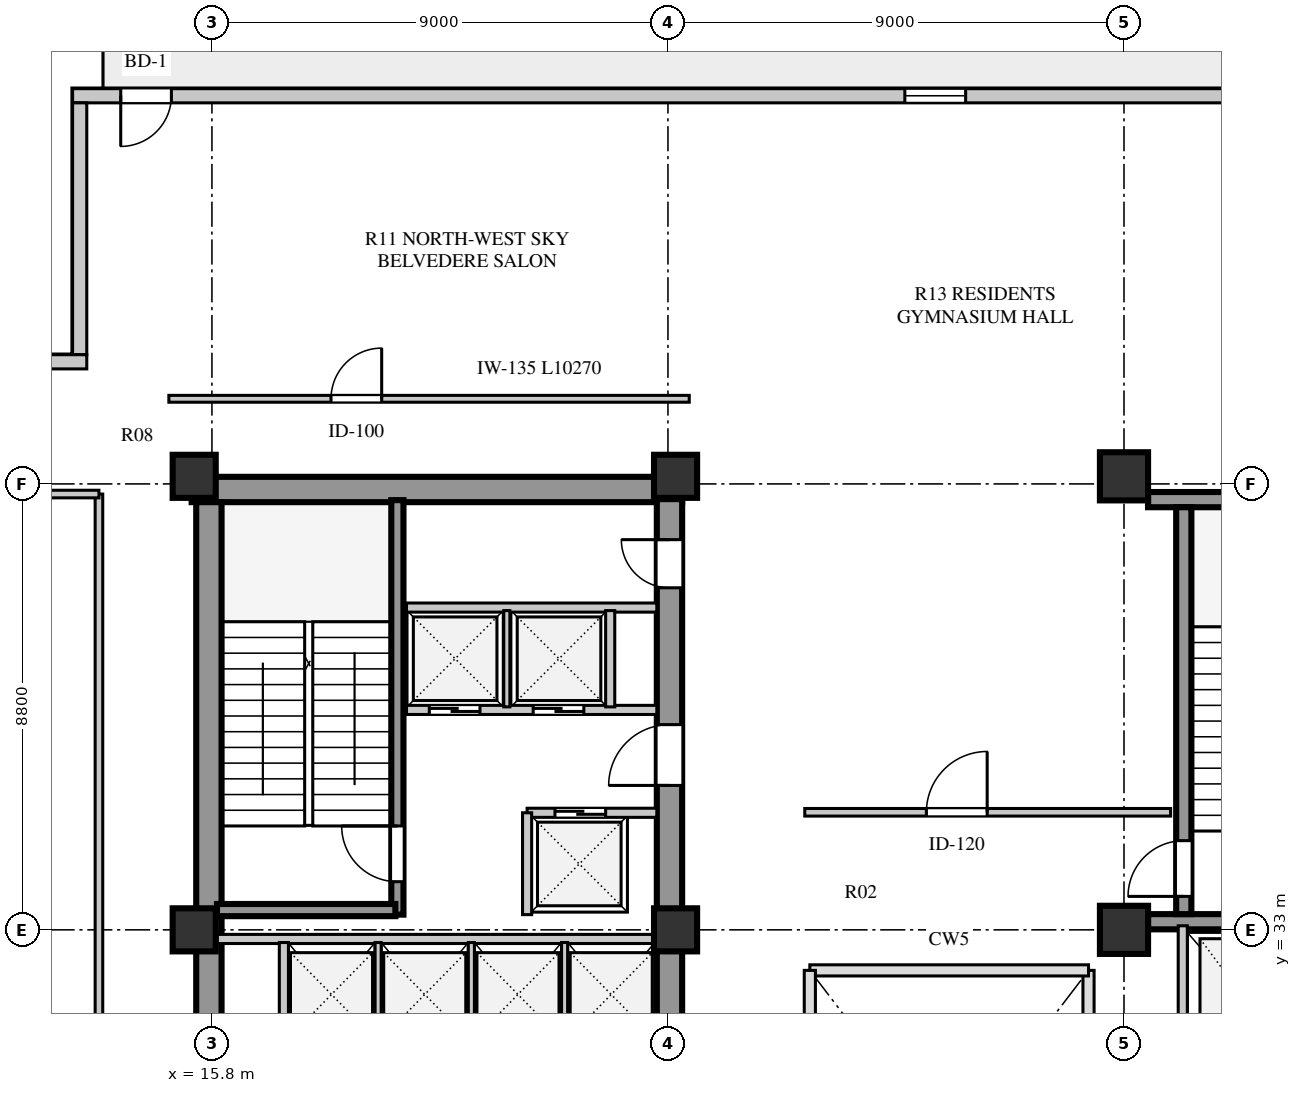
"""IFC4 building model, lengths in metres.
Left out: names, types, materials, properties, quantities, classifications, styles, units other than length and angle.
Written with IfcOpenShell. Run it as: python <this file> out.ifc"""

import sys

from ifc_helpers import new_model, si_unit, direction, frame, frame_2d, origin, origin_2d, place, context, subcontext, project, spatial, rectangle, extrude, element, fill, save


model = new_model("IFC4")
c1 = context("Model", 3, precision=1e-05, world=origin(), true_north=direction((0.0, 1.0)))
c2 = subcontext(c1, "Body", "Model", "MODEL_VIEW")
j1 = project(units=[si_unit("LENGTHUNIT", "METRE"), si_unit("PLANEANGLEUNIT", "RADIAN")], contexts=[c1])
p1 = place(None, origin())
s1 = spatial("IfcSite", under=j1, at=p1, CompositionType="ELEMENT")
p2 = place(p1, origin())
s2 = spatial("IfcBuilding", under=s1, at=p2, CompositionType="ELEMENT")
p3 = place(p2, frame((0.0, 0.0, 208.9)))
s3 = spatial("IfcBuildingStorey", under=s2, at=p3, CompositionType="ELEMENT", Elevation=208.9)
p4 = place(p3, frame((15.4, 41.69, 0.0), z_axis=(0.0, 0.0, 1.0), x_axis=(1.0, 0.0, 0.0)))
e1 = element("IfcWall", 1, at=p4, inside=s3, PredefinedType="SHEAR", context=c2, shape_type="SweptSolid", body=[
    extrude(rectangle(XDim=9.68, YDim=0.5, at=frame_2d((4.84, 0.0))), origin(), (0.0, 0.0, 1.0), 4.96),
])
p5 = place(p3, frame((15.74, 15.81, 0.0), z_axis=(0.0, 0.0, 1.0), x_axis=(0.0, 1.0, 0.0)))
e2 = element("IfcWall", 2, at=p5, inside=s3, PredefinedType="SHEAR", context=c2, shape_type="SweptSolid", body=[
    extrude(rectangle(XDim=25.63, YDim=0.5, at=frame_2d((12.815, 0.0))), origin(), (0.0, 0.0, 1.0), 4.96),
])
p6 = place(p3, frame((24.83, 15.74, 0.0), z_axis=(0.0, 0.0, 1.0), x_axis=(0.0, 1.0, 0.0)))
e3 = element("IfcWall", 3, at=p6, inside=s3, PredefinedType="SHEAR", context=c2, shape_type="SweptSolid", body=[
    extrude(rectangle(XDim=25.76, YDim=0.5, at=frame_2d((12.88, 0.0))), origin(), (0.0, 0.0, 1.0), 4.96),
])
p7 = place(p6, frame((1.61, 0.0, 0.0)))
e4 = element("IfcOpeningElement", 4, at=p7, cuts=e3, PredefinedType="OPENING", context=c2, shape_type="SweptSolid", body=[
    extrude(rectangle(XDim=1.2, YDim=2.1, at=frame_2d((0.6, 1.05))), frame((0.0, 0.26, 0.0), z_axis=(0.0, -1.0, 0.0), x_axis=(1.0, 0.0, 0.0)), (0.0, 0.0, 1.0), 0.52),
])
p8 = place(p6, frame((6.78, 0.0, 0.0)))
e5 = element("IfcOpeningElement", 5, at=p8, cuts=e3, PredefinedType="OPENING", context=c2, shape_type="SweptSolid", body=[
    extrude(rectangle(XDim=0.85, YDim=2.06, at=frame_2d((0.425, 1.03))), frame((0.0, 0.26, 0.0), z_axis=(0.0, -1.0, 0.0), x_axis=(1.0, 0.0, 0.0)), (0.0, 0.0, 1.0), 0.52),
])
p9 = place(p6, frame((12.11, 0.0, 0.0)))
e6 = element("IfcOpeningElement", 6, at=p9, cuts=e3, PredefinedType="OPENING", context=c2, shape_type="SweptSolid", body=[
    extrude(rectangle(XDim=1.5, YDim=2.12, at=frame_2d((0.75, 1.06))), frame((0.0, 0.26, 0.0), z_axis=(0.0, -1.0, 0.0), x_axis=(1.0, 0.0, 0.0)), (0.0, 0.0, 1.0), 0.52),
])
p10 = place(p6, frame((20.11, 0.0, 0.0)))
e7 = element("IfcOpeningElement", 7, at=p10, cuts=e3, PredefinedType="OPENING", context=c2, shape_type="SweptSolid", body=[
    extrude(rectangle(XDim=1.2, YDim=2.12, at=frame_2d((0.6, 1.06))), frame((0.0, 0.26, 0.0), z_axis=(0.0, -1.0, 0.0), x_axis=(1.0, 0.0, 0.0)), (0.0, 0.0, 1.0), 0.52),
])
p11 = place(p6, frame((24.01, 0.0, 0.0)))
e8 = element("IfcOpeningElement", 8, at=p11, cuts=e3, PredefinedType="OPENING", context=c2, shape_type="SweptSolid", body=[
    extrude(rectangle(XDim=0.95, YDim=2.1, at=frame_2d((0.475, 1.05))), frame((0.0, 0.26, 0.0), z_axis=(0.0, -1.0, 0.0), x_axis=(1.0, 0.0, 0.0)), (0.0, 0.0, 1.0), 0.52),
])
for number, where, z_axis, x_axis in (
    (9, (34.275, 33.16, 0.0), (0.0, 0.0, 1.0), (1.0, 0.0, 0.0)),
    (10, (34.275, 41.49, 0.0), (0.0, 0.0, 1.0), (1.0, 0.0, 0.0)),
):
    element("IfcWall", number, at=place(p3, frame(where, z_axis=z_axis, x_axis=x_axis)), inside=s3, PredefinedType="SHEAR", context=c2, shape_type="SweptSolid", body=[
        extrude(rectangle(XDim=4.595, YDim=0.3, at=frame_2d((2.298, 0.0))), origin(), (0.0, 0.0, 1.0), 4.96),
    ])
p12 = place(p3, frame((34.98, 33.31, 0.0), z_axis=(0.0, 0.0, 1.0), x_axis=(0.0, 1.0, 0.0)))
e11 = element("IfcWall", 11, at=p12, inside=s3, PredefinedType="SHEAR", context=c2, shape_type="SweptSolid", body=[
    extrude(rectangle(XDim=8.03, YDim=0.3, at=frame_2d((4.015, 0.0))), origin(), (0.0, 0.0, 1.0), 4.96),
])
p13 = place(p12, frame((0.35, 0.0, 0.0)))
e12 = element("IfcOpeningElement", 12, at=p13, cuts=e11, PredefinedType="OPENING", context=c2, shape_type="SweptSolid", body=[
    extrude(rectangle(XDim=1.1, YDim=2.1, at=frame_2d((0.55, 1.05))), frame((0.0, 0.16, 0.0), z_axis=(0.0, -1.0, 0.0), x_axis=(1.0, 0.0, 0.0)), (0.0, 0.0, 1.0), 0.32),
])
for number, where, z_axis, x_axis in (
    (13, (15.45, 33.0, 0.0), (0.0, 0.0, 1.0), (1.0, 0.0, 0.0)),
    (14, (15.45, 41.95, 0.0), (0.0, 0.0, 1.0), (1.0, 0.0, 0.0)),
    (15, (24.95, 33.0, 0.0), (0.0, 0.0, 1.0), (1.0, 0.0, 0.0)),
    (16, (24.95, 41.95, 0.0), (0.0, 0.0, 1.0), (1.0, 0.0, 0.0)),
):
    element("IfcColumn", number, at=place(p3, frame(where, z_axis=z_axis, x_axis=x_axis)), inside=s3, PredefinedType="COLUMN", context=c2, shape_type="SweptSolid", body=[
        extrude(rectangle(XDim=0.85, YDim=0.85, at=origin_2d()), origin(), (0.0, 0.0, 1.0), 4.96),
    ])
for number, where, z_axis, x_axis in (
    (17, (33.8, 33.0, 0.0), (0.0, 0.0, 1.0), (1.0, 0.0, 0.0)),
    (18, (33.8, 41.95, 0.0), (0.0, 0.0, 1.0), (1.0, 0.0, 0.0)),
):
    element("IfcColumn", number, at=place(p3, frame(where, z_axis=z_axis, x_axis=x_axis)), inside=s3, PredefinedType="COLUMN", context=c2, shape_type="SweptSolid", body=[
        extrude(rectangle(XDim=0.95, YDim=0.95, at=origin_2d()), origin(), (0.0, 0.0, 1.0), 4.96),
    ])
p14 = place(p3, frame((45.55, 49.46, 0.0), z_axis=(0.0, 0.0, 1.0), x_axis=(-1.0, 0.0, 0.0)))
e19 = element("IfcWall", 19, at=p14, inside=s3, PredefinedType="STANDARD", context=c2, shape_type="SweptSolid", body=[
    extrude(rectangle(XDim=32.5, YDim=0.28, at=frame_2d((16.25, 0.0))), origin(), (0.0, 0.0, 1.0), 4.96),
])
p15 = place(p14, frame((30.55, 0.0, 0.0)))
e20 = element("IfcOpeningElement", 20, at=p15, cuts=e19, PredefinedType="OPENING", context=c2, shape_type="SweptSolid", body=[
    extrude(rectangle(XDim=1.0, YDim=2.05, at=frame_2d((0.5, 1.025))), frame((0.0, 0.15, 0.0), z_axis=(0.0, -1.0, 0.0), x_axis=(1.0, 0.0, 0.0)), (0.0, 0.0, 1.0), 0.3),
])
p16 = place(p14, frame((14.875, 0.0, 0.65)))
e21 = element("IfcOpeningElement", 21, at=p16, cuts=e19, PredefinedType="OPENING", context=c2, shape_type="SweptSolid", body=[
    extrude(rectangle(XDim=1.2, YDim=1.25, at=frame_2d((0.6, 0.625))), frame((0.0, 0.15, 0.0), z_axis=(0.0, -1.0, 0.0), x_axis=(1.0, 0.0, 0.0)), (0.0, 0.0, 1.0), 0.3),
])
p17 = place(p3, frame((13.19, 49.32, 0.0), z_axis=(0.0, 0.0, 1.0), x_axis=(0.0, -1.0, 0.0)))
e22 = element("IfcWall", 22, at=p17, inside=s3, PredefinedType="STANDARD", context=c2, shape_type="SweptSolid", body=[
    extrude(rectangle(XDim=4.97, YDim=0.28, at=frame_2d((2.485, 0.0))), origin(), (0.0, 0.0, 1.0), 4.96),
])
p18 = place(p3, frame((13.33, 44.21, 0.0), z_axis=(0.0, 0.0, 1.0), x_axis=(-1.0, 0.0, 0.0)))
e23 = element("IfcWall", 23, at=p18, inside=s3, PredefinedType="STANDARD", context=c2, shape_type="SweptSolid", body=[
    extrude(rectangle(XDim=5.53, YDim=0.28, at=frame_2d((2.765, 0.0))), origin(), (0.0, 0.0, 1.0), 4.96),
])
p19 = place(p3, frame((15.9, 32.82, 0.0), z_axis=(0.0, 0.0, 1.0), x_axis=(1.0, 0.0, 0.0)))
e24 = element("IfcWall", 24, at=p19, inside=s3, PredefinedType="SOLIDWALL", context=c2, shape_type="SweptSolid", body=[
    extrude(rectangle(XDim=8.68, YDim=0.18, at=frame_2d((4.34, 0.0))), origin(), (0.0, 0.0, 1.0), 4.31),
])
p20 = place(p3, frame((17.22, 30.7, 0.0), z_axis=(0.0, 0.0, 1.0), x_axis=(0.0, 1.0, 0.0)))
e25 = element("IfcWall", 25, at=p20, inside=s3, PredefinedType="SOLIDWALL", context=c2, shape_type="SweptSolid", body=[
    extrude(rectangle(XDim=2.05, YDim=0.18, at=frame_2d((1.025, 0.0))), origin(), (0.0, 0.0, 1.0), 4.96),
])
for number, where, z_axis, x_axis in (
    (26, (19.08, 30.7, 0.0), (0.0, 0.0, 1.0), (0.0, 1.0, 0.0)),
    (27, (20.92, 30.7, 0.0), (0.0, 0.0, 1.0), (0.0, 1.0, 0.0)),
    (28, (22.76, 30.7, 0.0), (0.0, 0.0, 1.0), (0.0, 1.0, 0.0)),
):
    element("IfcWall", number, at=place(p3, frame(where, z_axis=z_axis, x_axis=x_axis)), inside=s3, PredefinedType="PARTITIONING", context=c2, shape_type="SweptSolid", body=[
        extrude(rectangle(XDim=2.05, YDim=0.12, at=frame_2d((1.025, 0.0))), origin(), (0.0, 0.0, 1.0), 4.96),
    ])
p21 = place(p3, frame((19.46, 33.3, 0.0), z_axis=(0.0, 0.0, 1.0), x_axis=(0.0, 1.0, 0.0)))
e29 = element("IfcWall", 29, at=p21, inside=s3, PredefinedType="SHEAR", context=c2, shape_type="SweptSolid", body=[
    extrude(rectangle(XDim=8.18, YDim=0.24, at=frame_2d((4.09, 0.0))), origin(), (0.0, 0.0, 1.0), 5.2),
])
p22 = place(p21, frame((0.65, 0.0, 0.0)))
e30 = element("IfcOpeningElement", 30, at=p22, cuts=e29, PredefinedType="OPENING", context=c2, shape_type="SweptSolid", body=[
    extrude(rectangle(XDim=1.1, YDim=2.1, at=frame_2d((0.55, 1.05))), frame((0.0, 0.13, 0.0), z_axis=(0.0, -1.0, 0.0), x_axis=(1.0, 0.0, 0.0)), (0.0, 0.0, 1.0), 0.26),
])
p23 = place(p3, frame((15.9, 33.39, 0.0), z_axis=(0.0, 0.0, 1.0), x_axis=(1.0, 0.0, 0.0)))
e31 = element("IfcWall", 31, at=p23, inside=s3, PredefinedType="SHEAR", context=c2, shape_type="SweptSolid", body=[
    extrude(rectangle(XDim=3.52, YDim=0.24, at=frame_2d((1.76, 0.0))), origin(), (0.0, 0.0, 1.0), 5.2),
])
p24 = place(p3, frame((22.02, 35.31, 0.0), z_axis=(0.0, 0.0, 1.0), x_axis=(1.0, 0.0, 0.0)))
e32 = element("IfcWall", 32, at=p24, inside=s3, PredefinedType="SOLIDWALL", context=c2, shape_type="SweptSolid", body=[
    extrude(rectangle(XDim=2.56, YDim=0.18, at=frame_2d((1.28, 0.0))), origin(), (0.0, 0.0, 1.0), 4.96),
])
p25 = place(p24, frame((0.55, 0.0, 0.0)))
e33 = element("IfcOpeningElement", 33, at=p25, cuts=e32, PredefinedType="OPENING", context=c2, shape_type="SweptSolid", body=[
    extrude(rectangle(XDim=1.0, YDim=2.1, at=frame_2d((0.5, 1.05))), frame((0.0, 0.1, 0.0), z_axis=(0.0, -1.0, 0.0), x_axis=(1.0, 0.0, 0.0)), (0.0, 0.0, 1.0), 0.2),
])
p26 = place(p3, frame((22.02, 33.3, 0.0), z_axis=(0.0, 0.0, 1.0), x_axis=(0.0, 1.0, 0.0)))
e34 = element("IfcWall", 34, at=p26, inside=s3, PredefinedType="SOLIDWALL", context=c2, shape_type="SweptSolid", body=[
    extrude(rectangle(XDim=2.01, YDim=0.18, at=frame_2d((1.005, 0.0))), origin(), (0.0, 0.0, 1.0), 4.96),
])
p27 = place(p3, frame((19.64, 37.34, 0.0), z_axis=(0.0, 0.0, 1.0), x_axis=(1.0, 0.0, 0.0)))
e35 = element("IfcWall", 35, at=p27, inside=s3, PredefinedType="SOLIDWALL", context=c2, shape_type="SweptSolid", body=[
    extrude(rectangle(XDim=4.94, YDim=0.18, at=frame_2d((2.47, 0.0))), origin(), (0.0, 0.0, 1.0), 4.96),
])
p28 = place(p27, frame((0.45, 0.0, 0.0)))
e36 = element("IfcOpeningElement", 36, at=p28, cuts=e35, PredefinedType="OPENING", context=c2, shape_type="SweptSolid", body=[
    extrude(rectangle(XDim=1.0, YDim=2.1, at=frame_2d((0.5, 1.05))), frame((0.0, 0.1, 0.0), z_axis=(0.0, -1.0, 0.0), x_axis=(1.0, 0.0, 0.0)), (0.0, 0.0, 1.0), 0.2),
])
p29 = place(p27, frame((2.5, 0.0, 0.0)))
e37 = element("IfcOpeningElement", 37, at=p29, cuts=e35, PredefinedType="OPENING", context=c2, shape_type="SweptSolid", body=[
    extrude(rectangle(XDim=1.0, YDim=2.1, at=frame_2d((0.5, 1.05))), frame((0.0, 0.1, 0.0), z_axis=(0.0, -1.0, 0.0), x_axis=(1.0, 0.0, 0.0)), (0.0, 0.0, 1.0), 0.2),
])
p30 = place(p3, frame((19.64, 39.36, 0.0), z_axis=(0.0, 0.0, 1.0), x_axis=(1.0, 0.0, 0.0)))
e38 = element("IfcWall", 38, at=p30, inside=s3, PredefinedType="SOLIDWALL", context=c2, shape_type="SweptSolid", body=[
    extrude(rectangle(XDim=4.94, YDim=0.18, at=frame_2d((2.47, 0.0))), origin(), (0.0, 0.0, 1.0), 4.96),
])
p31 = place(p3, frame((21.62, 37.4, 0.0), z_axis=(0.0, 0.0, 1.0), x_axis=(0.0, 1.0, 0.0)))
e39 = element("IfcWall", 39, at=p31, inside=s3, PredefinedType="PARTITIONING", context=c2, shape_type="SweptSolid", body=[
    extrude(rectangle(XDim=1.9, YDim=0.12, at=frame_2d((0.95, 0.0))), origin(), (0.0, 0.0, 1.0), 4.96),
])
p32 = place(p3, frame((23.66, 37.4, 0.0), z_axis=(0.0, 0.0, 1.0), x_axis=(0.0, 1.0, 0.0)))
e40 = element("IfcWall", 40, at=p32, inside=s3, PredefinedType="SOLIDWALL", context=c2, shape_type="SweptSolid", body=[
    extrude(rectangle(XDim=1.9, YDim=0.18, at=frame_2d((0.95, 0.0))), origin(), (0.0, 0.0, 1.0), 4.96),
])
p33 = place(p3, frame((34.96, 28.86, 0.0), z_axis=(0.0, 0.0, 1.0), x_axis=(0.0, 1.0, 0.0)))
e41 = element("IfcWall", 41, at=p33, inside=s3, PredefinedType="SOLIDWALL", context=c2, shape_type="SweptSolid", body=[
    extrude(rectangle(XDim=4.22, YDim=0.18, at=frame_2d((2.11, 0.0))), origin(), (0.0, 0.0, 1.0), 4.96),
])
p34 = place(p3, frame((13.57, 15.6, 0.0), z_axis=(0.0, 0.0, 1.0), x_axis=(0.0, 1.0, 0.0)))
e42 = element("IfcWall", 42, at=p34, inside=s3, PredefinedType="PARTITIONING", context=c2, shape_type="SweptSolid", body=[
    extrude(rectangle(XDim=26.0, YDim=0.15, at=frame_2d((13.0, 0.0))), origin(), (0.0, 0.0, 1.0), 4.96),
])
p35 = place(p34, frame((2.8, 0.0, 0.0)))
e43 = element("IfcOpeningElement", 43, at=p35, cuts=e42, PredefinedType="OPENING", context=c2, shape_type="SweptSolid", body=[
    extrude(rectangle(XDim=0.95, YDim=2.08, at=frame_2d((0.475, 1.04))), frame((0.0, 0.085, 0.0), z_axis=(0.0, -1.0, 0.0), x_axis=(1.0, 0.0, 0.0)), (0.0, 0.0, 1.0), 0.17),
])
p36 = place(p3, frame((8.08, 41.6, 0.0), z_axis=(0.0, 0.0, 1.0), x_axis=(1.0, 0.0, 0.0)))
e44 = element("IfcWall", 44, at=p36, inside=s3, PredefinedType="PARTITIONING", context=c2, shape_type="SweptSolid", body=[
    extrude(rectangle(XDim=5.49, YDim=0.15, at=frame_2d((2.745, 0.0))), origin(), (0.0, 0.0, 1.0), 3.88),
])
p37 = place(p3, frame((14.95, 43.48, 0.0), z_axis=(0.0, 0.0, 1.0), x_axis=(1.0, 0.0, 0.0)))
e45 = element("IfcWall", 45, at=p37, inside=s3, PredefinedType="PARTITIONING", context=c2, shape_type="SweptSolid", body=[
    extrude(rectangle(XDim=10.27, YDim=0.135, at=frame_2d((5.135, 0.0))), origin(), (0.0, 0.0, 1.0), 4.96),
])
p38 = place(p37, frame((3.2, 0.0, 0.0)))
e46 = element("IfcOpeningElement", 46, at=p38, cuts=e45, PredefinedType="OPENING", context=c2, shape_type="SweptSolid", body=[
    extrude(rectangle(XDim=1.0, YDim=2.08, at=frame_2d((0.5, 1.04))), frame((0.0, 0.078, 0.0), z_axis=(0.0, -1.0, 0.0), x_axis=(1.0, 0.0, 0.0)), (0.0, 0.0, 1.0), 0.155),
])
p39 = place(p3, frame((27.5, 35.32, 0.0), z_axis=(0.0, 0.0, 1.0), x_axis=(1.0, 0.0, 0.0)))
e47 = element("IfcWall", 47, at=p39, inside=s3, PredefinedType="PARTITIONING", context=c2, shape_type="SweptSolid", body=[
    extrude(rectangle(XDim=7.22, YDim=0.15, at=frame_2d((3.61, 0.0))), origin(), (0.0, 0.0, 1.0), 4.96),
])
p40 = place(p39, frame((2.4, 0.0, 0.0)))
e48 = element("IfcOpeningElement", 48, at=p40, cuts=e47, PredefinedType="OPENING", context=c2, shape_type="SweptSolid", body=[
    extrude(rectangle(XDim=1.2, YDim=2.1, at=frame_2d((0.6, 1.05))), frame((0.0, 0.085, 0.0), z_axis=(0.0, -1.0, 0.0), x_axis=(1.0, 0.0, 0.0)), (0.0, 0.0, 1.0), 0.17),
])
p41 = place(p15, frame((1.0, 0.0, 0.0), z_axis=(0.0, 0.0, 1.0), x_axis=(-1.0, 0.0, 0.0)))
e49 = element("IfcDoor", 49, at=p41, inside=s3, OperationType="SINGLE_SWING_LEFT", PredefinedType="DOOR", context=c2, shape_type="SweptSolid", body=[
    extrude(rectangle(XDim=1.0, YDim=2.05, at=frame_2d((0.5, 1.025))), frame((0.0, 0.025, 0.0), z_axis=(0.0, -1.0, 0.0), x_axis=(1.0, 0.0, 0.0)), (0.0, 0.0, 1.0), 0.05),
])
fill(e20, e49)
p42 = place(p16, origin())
e50 = element("IfcWindow", 50, at=p42, inside=s3, PartitioningType="SINGLE_PANEL", PredefinedType="WINDOW", context=c2, shape_type="SweptSolid", body=[
    extrude(rectangle(XDim=1.2, YDim=1.25, at=frame_2d((0.6, 0.625))), frame((0.0, 0.03, 0.0), z_axis=(0.0, -1.0, 0.0), x_axis=(1.0, 0.0, 0.0)), (0.0, 0.0, 1.0), 0.06),
])
fill(e21, e50)
p43 = place(p22, origin())
e51 = element("IfcDoor", 51, at=p43, inside=s3, OperationType="SINGLE_SWING_RIGHT", PredefinedType="DOOR", context=c2, shape_type="SweptSolid", body=[
    extrude(rectangle(XDim=1.1, YDim=2.1, at=frame_2d((0.55, 1.05))), frame((0.0, 0.025, 0.0), z_axis=(0.0, -1.0, 0.0), x_axis=(1.0, 0.0, 0.0)), (0.0, 0.0, 1.0), 0.05),
])
fill(e30, e51)
p44 = place(p10, frame((1.2, 0.0, 0.0), z_axis=(0.0, 0.0, 1.0), x_axis=(-1.0, 0.0, 0.0)))
e52 = element("IfcDoor", 52, at=p44, inside=s3, OperationType="SINGLE_SWING_RIGHT", PredefinedType="DOOR", context=c2, shape_type="SweptSolid", body=[
    extrude(rectangle(XDim=1.2, YDim=2.12, at=frame_2d((0.6, 1.06))), frame((0.0, 0.025, 0.0), z_axis=(0.0, -1.0, 0.0), x_axis=(1.0, 0.0, 0.0)), (0.0, 0.0, 1.0), 0.05),
])
fill(e7, e52)
p45 = place(p28, frame((1.0, 0.0, 0.0), z_axis=(0.0, 0.0, 1.0), x_axis=(-1.0, 0.0, 0.0)))
e53 = element("IfcDoor", 53, at=p45, inside=s3, OperationType="DOUBLE_DOOR_SLIDING", PredefinedType="DOOR", context=c2, shape_type="SweptSolid", body=[
    extrude(rectangle(XDim=1.0, YDim=2.1, at=frame_2d((0.5, 1.05))), frame((0.0, 0.025, 0.0), z_axis=(0.0, -1.0, 0.0), x_axis=(1.0, 0.0, 0.0)), (0.0, 0.0, 1.0), 0.05),
])
fill(e36, e53)
p46 = place(p29, frame((1.0, 0.0, 0.0), z_axis=(0.0, 0.0, 1.0), x_axis=(-1.0, 0.0, 0.0)))
e54 = element("IfcDoor", 54, at=p46, inside=s3, OperationType="DOUBLE_DOOR_SLIDING", PredefinedType="DOOR", context=c2, shape_type="SweptSolid", body=[
    extrude(rectangle(XDim=1.0, YDim=2.1, at=frame_2d((0.5, 1.05))), frame((0.0, 0.025, 0.0), z_axis=(0.0, -1.0, 0.0), x_axis=(1.0, 0.0, 0.0)), (0.0, 0.0, 1.0), 0.05),
])
fill(e37, e54)
p47 = place(p25, origin())
e55 = element("IfcDoor", 55, at=p47, inside=s3, OperationType="DOUBLE_DOOR_SLIDING", PredefinedType="DOOR", context=c2, shape_type="SweptSolid", body=[
    extrude(rectangle(XDim=1.0, YDim=2.1, at=frame_2d((0.5, 1.05))), frame((0.0, 0.025, 0.0), z_axis=(0.0, -1.0, 0.0), x_axis=(1.0, 0.0, 0.0)), (0.0, 0.0, 1.0), 0.05),
])
fill(e33, e55)
p48 = place(p11, frame((0.95, 0.0, 0.0), z_axis=(0.0, 0.0, 1.0), x_axis=(-1.0, 0.0, 0.0)))
e56 = element("IfcDoor", 56, at=p48, inside=s3, OperationType="SINGLE_SWING_LEFT", PredefinedType="DOOR", context=c2, shape_type="SweptSolid", body=[
    extrude(rectangle(XDim=0.95, YDim=2.1, at=frame_2d((0.475, 1.05))), frame((0.0, 0.025, 0.0), z_axis=(0.0, -1.0, 0.0), x_axis=(1.0, 0.0, 0.0)), (0.0, 0.0, 1.0), 0.05),
])
fill(e8, e56)
p49 = place(p13, origin())
e57 = element("IfcDoor", 57, at=p49, inside=s3, OperationType="SINGLE_SWING_LEFT", PredefinedType="DOOR", context=c2, shape_type="SweptSolid", body=[
    extrude(rectangle(XDim=1.1, YDim=2.1, at=frame_2d((0.55, 1.05))), frame((0.0, 0.025, 0.0), z_axis=(0.0, -1.0, 0.0), x_axis=(1.0, 0.0, 0.0)), (0.0, 0.0, 1.0), 0.05),
])
fill(e12, e57)
p50 = place(p38, origin())
e58 = element("IfcDoor", 58, at=p50, inside=s3, OperationType="SINGLE_SWING_RIGHT", PredefinedType="DOOR", context=c2, shape_type="SweptSolid", body=[
    extrude(rectangle(XDim=1.0, YDim=2.08, at=frame_2d((0.5, 1.04))), frame((0.0, 0.025, 0.0), z_axis=(0.0, -1.0, 0.0), x_axis=(1.0, 0.0, 0.0)), (0.0, 0.0, 1.0), 0.05),
])
fill(e46, e58)
p51 = place(p40, origin())
e59 = element("IfcDoor", 59, at=p51, inside=s3, OperationType="SINGLE_SWING_RIGHT", PredefinedType="DOOR", context=c2, shape_type="SweptSolid", body=[
    extrude(rectangle(XDim=1.2, YDim=2.1, at=frame_2d((0.6, 1.05))), frame((0.0, 0.025, 0.0), z_axis=(0.0, -1.0, 0.0), x_axis=(1.0, 0.0, 0.0)), (0.0, 0.0, 1.0), 0.05),
])
fill(e48, e59)
save(model, sys.argv[1])
